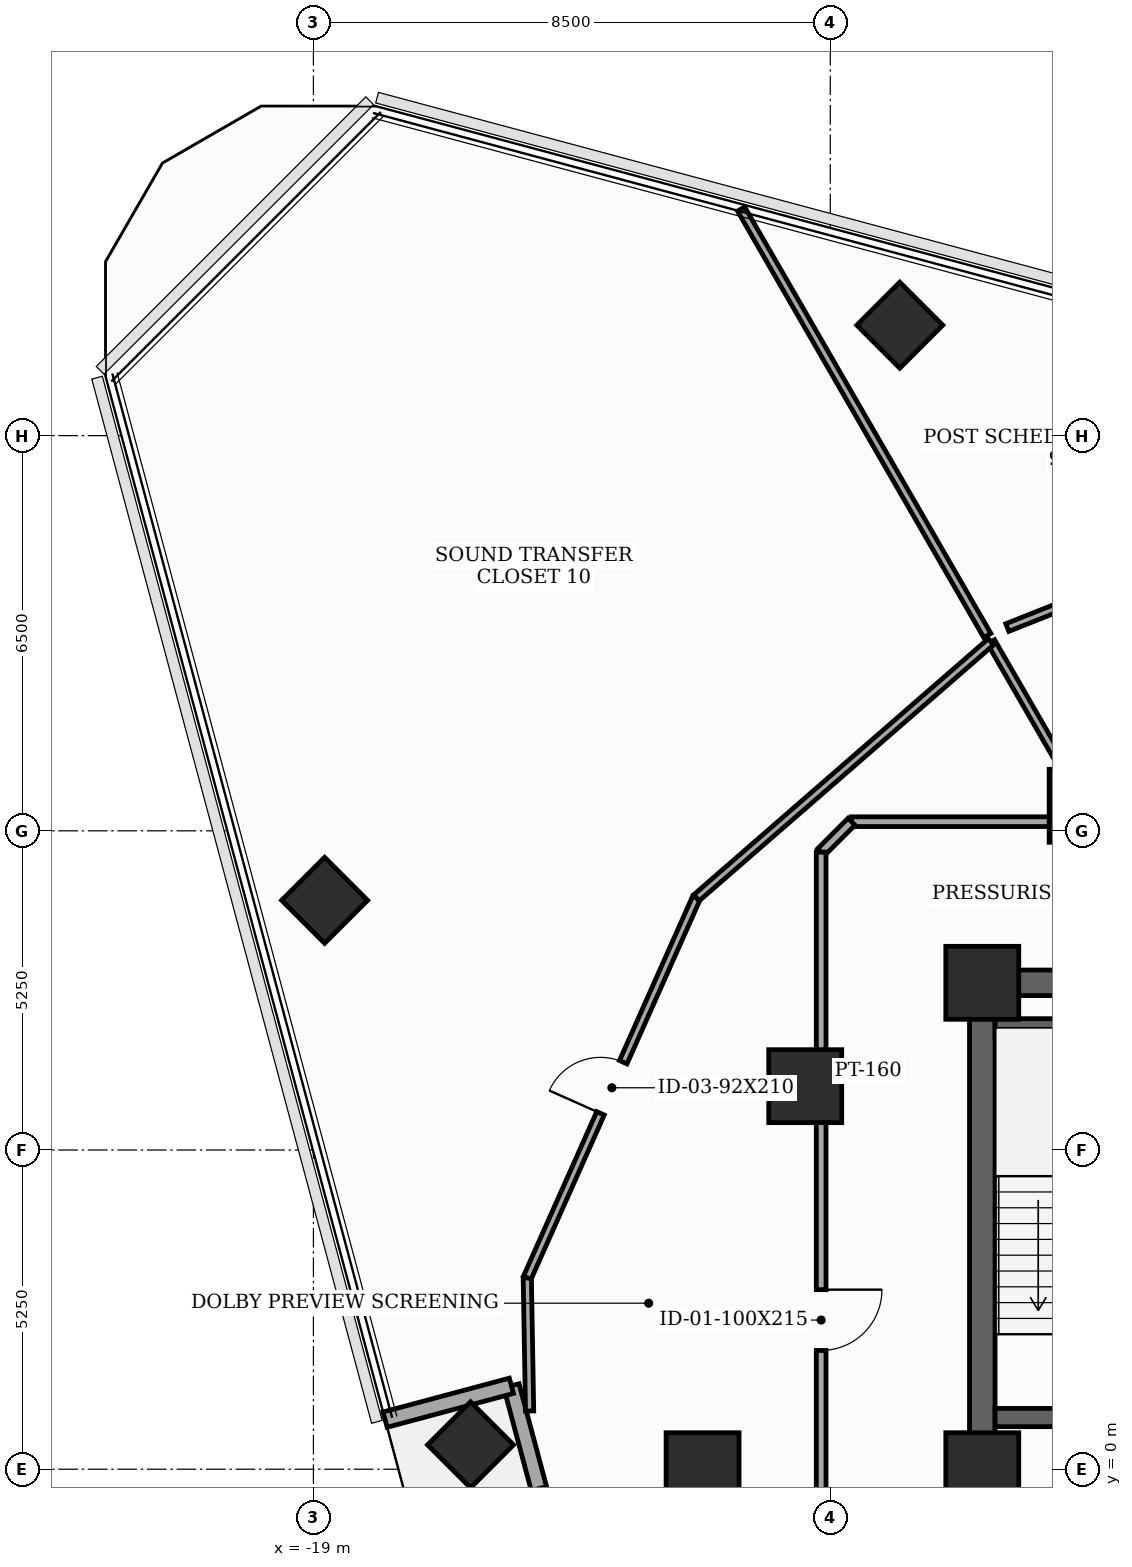
"""IFC4 building model, lengths in metres.
Left out: names, types, materials, properties, quantities, classifications, styles, units other than length and angle.
Written with IfcOpenShell. Run it as: python <this file> out.ifc"""

import sys

from ifc_helpers import new_model, si_unit, direction, frame, frame_2d, origin, origin_2d, place, context, subcontext, project, spatial, rectangle, extrude, element, fill, save


model = new_model("IFC4")
c1 = context("Model", 3, precision=1e-05, world=origin(), true_north=direction((0.0, 1.0)))
c2 = subcontext(c1, "Body", "Model", "MODEL_VIEW")
j1 = project(units=[si_unit("LENGTHUNIT", "METRE"), si_unit("PLANEANGLEUNIT", "RADIAN")], contexts=[c1])
p1 = place(None, origin())
s1 = spatial("IfcSite", under=j1, at=p1, CompositionType="ELEMENT")
p2 = place(p1, origin())
s2 = spatial("IfcBuilding", under=s1, at=p2, CompositionType="ELEMENT")
p3 = place(p2, frame((0.0, 0.0, 206.4)))
s3 = spatial("IfcBuildingStorey", under=s2, at=p3, CompositionType="ELEMENT", Elevation=206.4)
for number, where, z_axis, x_axis in (
    (1, (-8.0, 8.0, 0.0), (0.0, 0.0, 1.0), (1.0, 0.0, 0.0)),
    (2, (-8.0, 0.0, 0.0), (0.0, 0.0, 1.0), (1.0, 0.0, 0.0)),
    (3, (-6.3, 10.912, 0.0), (0.0, 0.0, 1.0), (1.0, 0.0, 0.0)),
    (4, (-10.912, 6.3, 0.0), (0.0, 0.0, 1.0), (1.0, 0.0, 0.0)),
    (5, (-12.6, 0.0, 0.0), (0.0, 0.0, 1.0), (1.0, 0.0, 0.0)),
):
    element("IfcColumn", number, at=place(p3, frame(where, z_axis=z_axis, x_axis=x_axis)), inside=s3, PredefinedType="COLUMN", context=c2, shape_type="SweptSolid", body=[
        extrude(rectangle(XDim=1.2, YDim=1.2, at=origin_2d()), origin(), (0.0, 0.0, 1.0), 3.7),
    ])
for number, where, z_axis, x_axis in (
    (6, (-9.357, 18.816, 0.0), (0.0, 0.0, 1.0), (0.707, 0.707, 0.0)),
    (7, (-18.816, 9.357, 0.0), (0.0, 0.0, 1.0), (0.707, 0.707, 0.0)),
    (8, (-16.416, 0.401, 0.0), (0.0, 0.0, 1.0), (0.707, 0.707, 0.0)),
):
    element("IfcColumn", number, at=place(p3, frame(where, z_axis=z_axis, x_axis=x_axis)), inside=s3, PredefinedType="COLUMN", context=c2, shape_type="SweptSolid", body=[
        extrude(rectangle(XDim=1.0, YDim=1.0, at=origin_2d()), origin(), (0.0, 0.0, 1.0), 3.7),
    ])
p4 = place(p3, frame((-15.744, 1.372, 0.0), z_axis=(0.0, 0.0, 1.0), x_axis=(0.25880915351, -0.965928476679, 0.0)))
e9 = element("IfcWall", 9, at=p4, inside=s3, PredefinedType="SOLIDWALL", context=c2, shape_type="SweptSolid", body=[
    extrude(rectangle(XDim=10.8, YDim=0.26, at=frame_2d((5.4, 0.0))), origin(), (0.0, 0.0, 1.0), 3.5),
])
p5 = place(p4, frame((1.75, 0.0, 0.0)))
e10 = element("IfcOpeningElement", 10, at=p5, cuts=e9, PredefinedType="OPENING", context=c2, shape_type="SweptSolid", body=[
    extrude(rectangle(XDim=1.6, YDim=2.08, at=frame_2d((0.8, 1.04))), frame((0.0, 0.14, 0.0), z_axis=(0.0, -1.0, 0.0), x_axis=(1.0, 0.0, 0.0)), (0.0, 0.0, 1.0), 0.28),
])
p6 = place(p4, frame((5.65, 0.0, 0.85)))
e11 = element("IfcOpeningElement", 11, at=p6, cuts=e9, PredefinedType="OPENING", context=c2, shape_type="SweptSolid", body=[
    extrude(rectangle(XDim=1.3, YDim=1.25, at=frame_2d((0.65, 0.625))), frame((0.0, 0.14, 0.0), z_axis=(0.0, -1.0, 0.0), x_axis=(1.0, 0.0, 0.0)), (0.0, 0.0, 1.0), 0.28),
])
p7 = place(p3, frame((-17.821, 0.815, 0.0), z_axis=(0.0, 0.0, 1.0), x_axis=(0.965910035775, 0.258877968916, 0.0)))
e12 = element("IfcWall", 12, at=p7, inside=s3, PredefinedType="SOLIDWALL", context=c2, shape_type="SweptSolid", body=[
    extrude(rectangle(XDim=2.15, YDim=0.26, at=frame_2d((1.075, 0.0))), origin(), (0.0, 0.0, 1.0), 3.5),
])
p8 = place(p3, frame((-8.0, -8.0, 0.0), z_axis=(0.0, 0.0, 1.0), x_axis=(0.0, 1.0, 0.0)))
e13 = element("IfcWall", 13, at=p8, inside=s3, PredefinedType="SHEAR", context=c2, shape_type="SweptSolid", body=[
    extrude(rectangle(XDim=16.0, YDim=0.42, at=frame_2d((8.0, 0.0))), origin(), (0.0, 0.0, 1.0), 3.5),
])
p9 = place(p8, frame((0.761, 0.0, 0.0)))
e14 = element("IfcOpeningElement", 14, at=p9, cuts=e13, PredefinedType="OPENING", context=c2, shape_type="SweptSolid", body=[
    extrude(rectangle(XDim=0.85, YDim=2.02, at=frame_2d((0.425, 1.01))), frame((0.0, 0.22, 0.0), z_axis=(0.0, -1.0, 0.0), x_axis=(1.0, 0.0, 0.0)), (0.0, 0.0, 1.0), 0.44),
])
p10 = place(p8, frame((5.35, 0.0, 0.0)))
e15 = element("IfcOpeningElement", 15, at=p10, cuts=e13, PredefinedType="OPENING", context=c2, shape_type="SweptSolid", body=[
    extrude(rectangle(XDim=1.05, YDim=2.15, at=frame_2d((0.525, 1.075))), frame((0.0, 0.22, 0.0), z_axis=(0.0, -1.0, 0.0), x_axis=(1.0, 0.0, 0.0)), (0.0, 0.0, 1.0), 0.44),
])
p11 = place(p3, frame((-8.0, 8.0, 0.0), z_axis=(0.0, 0.0, 1.0), x_axis=(1.0, 0.0, 0.0)))
e16 = element("IfcWall", 16, at=p11, inside=s3, PredefinedType="SHEAR", context=c2, shape_type="SweptSolid", body=[
    extrude(rectangle(XDim=16.0, YDim=0.42, at=frame_2d((8.0, 0.0))), origin(), (0.0, 0.0, 1.0), 3.5),
])
p12 = place(p11, frame((7.1, 0.0, 0.0)))
e17 = element("IfcOpeningElement", 17, at=p12, cuts=e16, PredefinedType="OPENING", context=c2, shape_type="SweptSolid", body=[
    extrude(rectangle(XDim=1.8, YDim=2.15, at=frame_2d((0.9, 1.075))), frame((0.0, 0.22, 0.0), z_axis=(0.0, -1.0, 0.0), x_axis=(1.0, 0.0, 0.0)), (0.0, 0.0, 1.0), 0.44),
])
p13 = place(p3, frame((-7.79, 0.85, 0.0), z_axis=(0.0, 0.0, 1.0), x_axis=(1.0, 0.0, 0.0)))
e18 = element("IfcWall", 18, at=p13, inside=s3, PredefinedType="SHEAR", context=c2, shape_type="SweptSolid", body=[
    extrude(rectangle(XDim=3.34, YDim=0.3, at=frame_2d((1.67, 0.0))), origin(), (0.0, 0.0, 1.0), 3.5),
])
p14 = place(p13, frame((1.85, 0.0, 0.0)))
e19 = element("IfcOpeningElement", 19, at=p14, cuts=e18, PredefinedType="OPENING", context=c2, shape_type="SweptSolid", body=[
    extrude(rectangle(XDim=1.05, YDim=2.15, at=frame_2d((0.525, 1.075))), frame((0.0, 0.16, 0.0), z_axis=(0.0, -1.0, 0.0), x_axis=(1.0, 0.0, 0.0)), (0.0, 0.0, 1.0), 0.32),
])
p15 = place(p3, frame((-7.79, 7.26, 0.0), z_axis=(0.0, 0.0, 1.0), x_axis=(1.0, 0.0, 0.0)))
e20 = element("IfcWall", 20, at=p15, inside=s3, PredefinedType="SHEAR", context=c2, shape_type="SweptSolid", body=[
    extrude(rectangle(XDim=3.34, YDim=0.3, at=frame_2d((1.67, 0.0))), origin(), (0.0, 0.0, 1.0), 3.5),
])
p16 = place(p3, frame((-6.149, 10.65, 0.0), z_axis=(0.0, 0.0, 1.0), x_axis=(-1.0, 0.0, 0.0)))
e21 = element("IfcWall", 21, at=p16, inside=s3, PredefinedType="PARTITIONING", context=c2, shape_type="SweptSolid", body=[
    extrude(rectangle(XDim=4.001, YDim=0.16, at=frame_2d((2.0, 0.0))), origin(), (0.0, 0.0, 1.0), 2.885),
])
p17 = place(p3, frame((-10.15, 10.65, 0.0), z_axis=(0.0, 0.0, 1.0), x_axis=(-0.707106781187, -0.707106781187, 0.0)))
e22 = element("IfcWall", 22, at=p17, inside=s3, PredefinedType="PARTITIONING", context=c2, shape_type="SweptSolid", body=[
    extrude(rectangle(XDim=0.707, YDim=0.16, at=frame_2d((0.354, 0.0))), origin(), (0.0, 0.0, 1.0), 3.5),
])
p18 = place(p3, frame((-10.65, 10.15, 0.0), z_axis=(0.0, 0.0, 1.0), x_axis=(0.0, -1.0, 0.0)))
e23 = element("IfcWall", 23, at=p18, inside=s3, PredefinedType="PARTITIONING", context=c2, shape_type="SweptSolid", body=[
    extrude(rectangle(XDim=12.414, YDim=0.16, at=frame_2d((6.207, 0.0))), origin(), (0.0, 0.0, 1.0), 2.885),
])
p19 = place(p18, frame((7.197, 0.0, 0.0)))
e24 = element("IfcOpeningElement", 24, at=p19, cuts=e23, PredefinedType="OPENING", context=c2, shape_type="SweptSolid", body=[
    extrude(rectangle(XDim=1.0, YDim=2.15, at=frame_2d((0.5, 1.075))), frame((0.0, 0.09, 0.0), z_axis=(0.0, -1.0, 0.0), x_axis=(1.0, 0.0, 0.0)), (0.0, 0.0, 1.0), 0.18),
])
p20 = place(p3, frame((-3.261, 15.562, 0.0), z_axis=(0.0, 0.0, 1.0), x_axis=(-0.929345677851, -0.369210794885, 0.0)))
e25 = element("IfcWall", 25, at=p20, inside=s3, PredefinedType="PARTITIONING", context=c2, shape_type="SweptSolid", body=[
    extrude(rectangle(XDim=4.656, YDim=0.135, at=frame_2d((2.328, 0.0))), origin(), (0.0, 0.0, 1.0), 2.985),
])
p21 = place(p3, frame((-7.857, 13.609, 0.0), z_axis=(0.0, 0.0, 1.0), x_axis=(0.499920397431, -0.866071357471, 0.0)))
e26 = element("IfcWall", 26, at=p21, inside=s3, PredefinedType="PARTITIONING", context=c2, shape_type="SweptSolid", body=[
    extrude(rectangle(XDim=3.417, YDim=0.135, at=frame_2d((1.708, 0.0))), origin(), (0.0, 0.0, 1.0), 2.885),
])
p22 = place(p3, frame((-11.967, 20.726, 0.0), z_axis=(0.0, 0.0, 1.0), x_axis=(0.499980770555, -0.866036505625, 0.0)))
e27 = element("IfcWall", 27, at=p22, inside=s3, PredefinedType="PARTITIONING", context=c2, shape_type="SweptSolid", body=[
    extrude(rectangle(XDim=8.099, YDim=0.135, at=frame_2d((4.05, 0.0))), origin(), (0.0, 0.0, 1.0), 2.985),
])
p23 = place(p3, frame((-15.445, 0.958, 0.0), z_axis=(0.0, 0.0, 1.0), x_axis=(-0.017480624805, 0.999847202205, 0.0)))
e28 = element("IfcWall", 28, at=p23, inside=s3, PredefinedType="PARTITIONING", context=c2, shape_type="SweptSolid", body=[
    extrude(rectangle(XDim=2.193, YDim=0.135, at=frame_2d((1.096, 0.0))), origin(), (0.0, 0.0, 1.0), 3.5),
])
p24 = place(p3, frame((-15.483, 3.15, 0.0), z_axis=(0.0, 0.0, 1.0), x_axis=(0.406757719511, 0.913536073518, 0.0)))
e29 = element("IfcWall", 29, at=p24, inside=s3, PredefinedType="PARTITIONING", context=c2, shape_type="SweptSolid", body=[
    extrude(rectangle(XDim=6.839, YDim=0.135, at=frame_2d((3.42, 0.0))), origin(), (0.0, 0.0, 1.0), 2.985),
])
p25 = place(p24, frame((2.96, 0.0, 0.0)))
e30 = element("IfcOpeningElement", 30, at=p25, cuts=e29, PredefinedType="OPENING", context=c2, shape_type="SweptSolid", body=[
    extrude(rectangle(XDim=0.92, YDim=2.1, at=frame_2d((0.46, 1.05))), frame((0.0, 0.077, 0.0), z_axis=(0.0, -1.0, 0.0), x_axis=(1.0, 0.0, 0.0)), (0.0, 0.0, 1.0), 0.155),
])
p26 = place(p3, frame((-12.701, 9.398, 0.0), z_axis=(0.0, 0.0, 1.0), x_axis=(0.754700505452, 0.656069468174, 0.0)))
e31 = element("IfcWall", 31, at=p26, inside=s3, PredefinedType="PARTITIONING", context=c2, shape_type="SweptSolid", body=[
    extrude(rectangle(XDim=6.418, YDim=0.135, at=frame_2d((3.209, 0.0))), origin(), (0.0, 0.0, 1.0), 3.5),
])
p27 = place(p19, origin())
e32 = element("IfcDoor", 32, at=p27, inside=s3, OperationType="SINGLE_SWING_LEFT", PredefinedType="DOOR", context=c2, shape_type="SweptSolid", body=[
    extrude(rectangle(XDim=1.0, YDim=2.15, at=frame_2d((0.5, 1.075))), frame((0.0, 0.025, 0.0), z_axis=(0.0, -1.0, 0.0), x_axis=(1.0, 0.0, 0.0)), (0.0, 0.0, 1.0), 0.05),
])
fill(e24, e32)
p28 = place(p25, origin())
e33 = element("IfcDoor", 33, at=p28, inside=s3, OperationType="SINGLE_SWING_LEFT", PredefinedType="DOOR", context=c2, shape_type="SweptSolid", body=[
    extrude(rectangle(XDim=0.92, YDim=2.1, at=frame_2d((0.46, 1.05))), frame((0.0, 0.025, 0.0), z_axis=(0.0, -1.0, 0.0), x_axis=(1.0, 0.0, 0.0)), (0.0, 0.0, 1.0), 0.05),
])
fill(e30, e33)
save(model, sys.argv[1])
